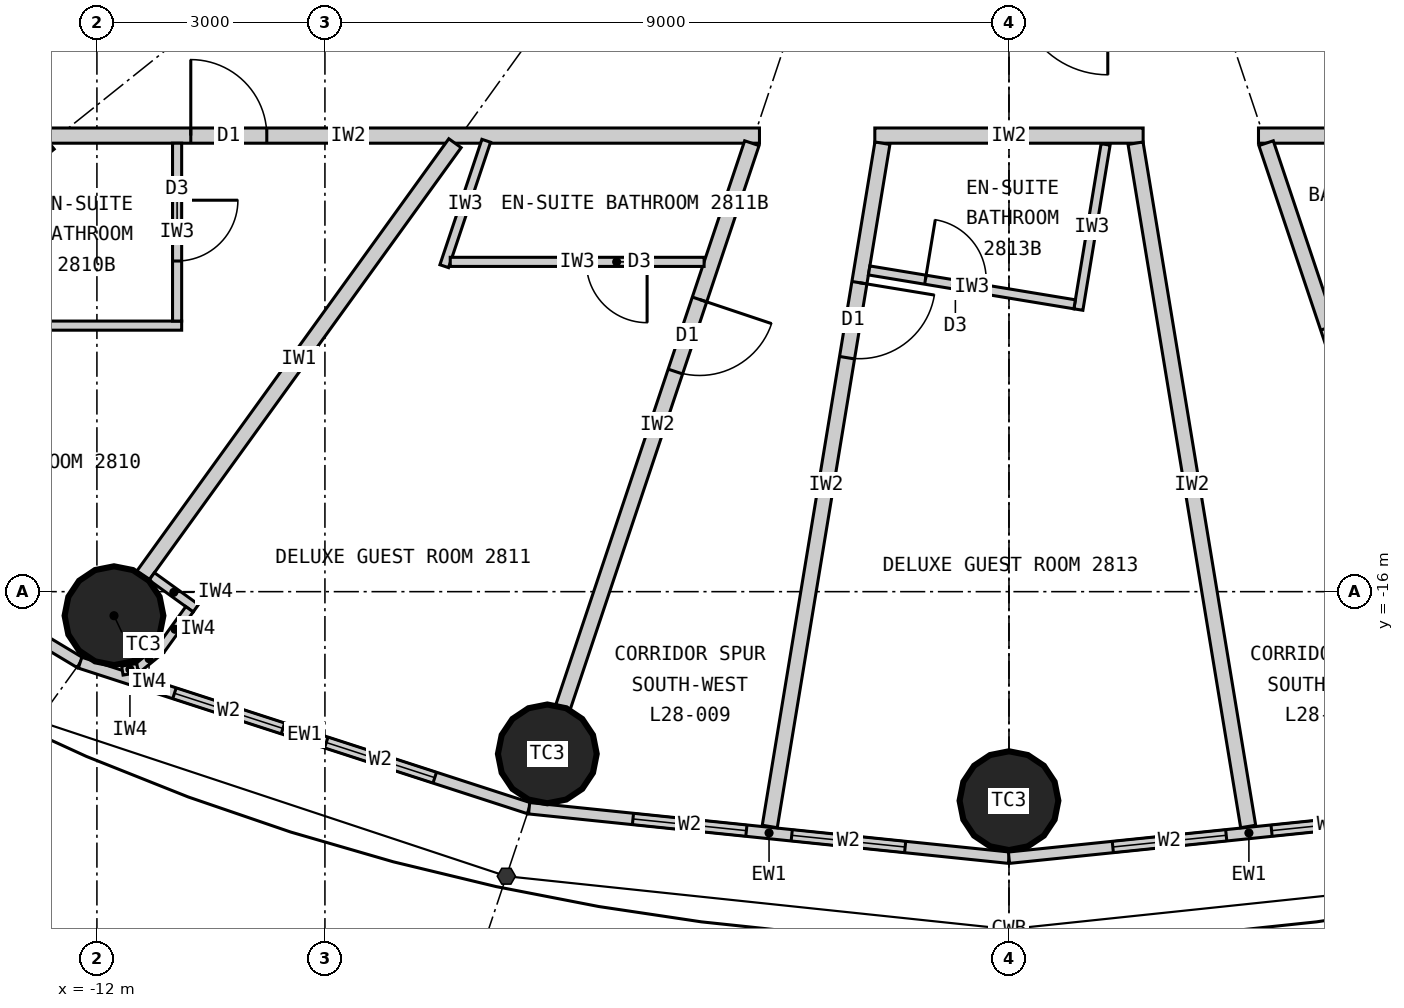
"""IFC4 building model, lengths in metres.
Left out: names, types, materials, properties, quantities, classifications, styles, units other than length and angle.
Written with IfcOpenShell. Run it as: python <this file> out.ifc"""

import sys

from ifc_helpers import new_model, si_unit, direction, frame, frame_2d, origin, origin_2d, place, context, subcontext, project, spatial, rectangle, circle, extrude, element, fill, save


model = new_model("IFC4")
c1 = context("Model", 3, precision=1e-05, world=origin(), true_north=direction((0.0, 1.0)))
c2 = subcontext(c1, "Body", "Model", "MODEL_VIEW")
j1 = project(units=[si_unit("LENGTHUNIT", "METRE"), si_unit("PLANEANGLEUNIT", "RADIAN")], contexts=[c1])
p1 = place(None, origin())
s1 = spatial("IfcSite", under=j1, at=p1, CompositionType="ELEMENT")
p2 = place(p1, origin())
s2 = spatial("IfcBuilding", under=s1, at=p2, CompositionType="ELEMENT")
p3 = place(p2, frame((0.0, 0.0, 112.2)))
s3 = spatial("IfcBuildingStorey", under=s2, at=p3, CompositionType="ELEMENT", Elevation=112.2)
for number, where, z_axis, x_axis in (
    (1, (-11.775, -16.316, 0.0), (0.0, 0.0, 1.0), (1.0, 0.0, 0.0)),
    (2, (-6.074, -18.135, 0.0), (0.0, 0.0, 1.0), (1.0, 0.0, 0.0)),
    (3, (0.0, -18.75, 0.0), (0.0, 0.0, 1.0), (1.0, 0.0, 0.0)),
):
    element("IfcColumn", number, at=place(p3, frame(where, z_axis=z_axis, x_axis=x_axis)), inside=s3, PredefinedType="COLUMN", context=c2, shape_type="SweptSolid", body=[
        extrude(circle(Radius=0.65, at=origin_2d()), origin(), (0.0, 0.0, 1.0), 3.3),
    ])
p4 = place(p3, frame((-17.332, -13.866, 0.0), z_axis=(0.0, 0.0, 1.0), x_axis=(0.857308573723, -0.514802884044, 0.0)))
e4 = element("IfcWall", 4, at=p4, inside=s3, PredefinedType="ELEMENTEDWALL", context=c2, shape_type="SweptSolid", body=[
    extrude(rectangle(XDim=5.961, YDim=0.15, at=frame_2d((2.98, 0.0))), origin(), (0.0, 0.0, 1.0), 3.12),
])
p5 = place(p4, frame((1.181, 0.0, 0.9)))
e5 = element("IfcOpeningElement", 5, at=p5, cuts=e4, PredefinedType="OPENING", context=c2, shape_type="SweptSolid", body=[
    extrude(rectangle(XDim=1.5, YDim=1.9, at=frame_2d((0.75, 0.95))), frame((0.0, 0.085, 0.0), z_axis=(0.0, -1.0, 0.0), x_axis=(1.0, 0.0, 0.0)), (0.0, 0.0, 1.0), 0.17),
])
p6 = place(p4, frame((3.281, 0.0, 0.9)))
e6 = element("IfcOpeningElement", 6, at=p6, cuts=e4, PredefinedType="OPENING", context=c2, shape_type="SweptSolid", body=[
    extrude(rectangle(XDim=1.5, YDim=1.9, at=frame_2d((0.75, 0.95))), frame((0.0, 0.085, 0.0), z_axis=(0.0, -1.0, 0.0), x_axis=(1.0, 0.0, 0.0)), (0.0, 0.0, 1.0), 0.17),
])
p7 = place(p3, frame((-12.221, -16.935, 0.0), z_axis=(0.0, 0.0, 1.0), x_axis=(0.951272691506, -0.308350881944, 0.0)))
e7 = element("IfcWall", 7, at=p7, inside=s3, PredefinedType="ELEMENTEDWALL", context=c2, shape_type="SweptSolid", body=[
    extrude(rectangle(XDim=6.211, YDim=0.15, at=frame_2d((3.105, 0.0))), origin(), (0.0, 0.0, 1.0), 3.12),
])
p8 = place(p7, frame((1.305, 0.0, 0.9)))
e8 = element("IfcOpeningElement", 8, at=p8, cuts=e7, PredefinedType="OPENING", context=c2, shape_type="SweptSolid", body=[
    extrude(rectangle(XDim=1.5, YDim=1.9, at=frame_2d((0.75, 0.95))), frame((0.0, 0.085, 0.0), z_axis=(0.0, -1.0, 0.0), x_axis=(1.0, 0.0, 0.0)), (0.0, 0.0, 1.0), 0.17),
])
p9 = place(p7, frame((3.405, 0.0, 0.9)))
e9 = element("IfcOpeningElement", 9, at=p9, cuts=e7, PredefinedType="OPENING", context=c2, shape_type="SweptSolid", body=[
    extrude(rectangle(XDim=1.5, YDim=1.9, at=frame_2d((0.75, 0.95))), frame((0.0, 0.085, 0.0), z_axis=(0.0, -1.0, 0.0), x_axis=(1.0, 0.0, 0.0)), (0.0, 0.0, 1.0), 0.17),
])
p10 = place(p3, frame((-6.313, -18.85, 0.0), z_axis=(0.0, 0.0, 1.0), x_axis=(0.994735690163, -0.102473931887, 0.0)))
e10 = element("IfcWall", 10, at=p10, inside=s3, PredefinedType="ELEMENTEDWALL", context=c2, shape_type="SweptSolid", body=[
    extrude(rectangle(XDim=6.347, YDim=0.15, at=frame_2d((3.173, 0.0))), origin(), (0.0, 0.0, 1.0), 3.12),
])
p11 = place(p10, frame((1.373, 0.0, 0.9)))
e11 = element("IfcOpeningElement", 11, at=p11, cuts=e10, PredefinedType="OPENING", context=c2, shape_type="SweptSolid", body=[
    extrude(rectangle(XDim=1.5, YDim=1.9, at=frame_2d((0.75, 0.95))), frame((0.0, 0.085, 0.0), z_axis=(0.0, -1.0, 0.0), x_axis=(1.0, 0.0, 0.0)), (0.0, 0.0, 1.0), 0.17),
])
p12 = place(p10, frame((3.473, 0.0, 0.9)))
e12 = element("IfcOpeningElement", 12, at=p12, cuts=e10, PredefinedType="OPENING", context=c2, shape_type="SweptSolid", body=[
    extrude(rectangle(XDim=1.5, YDim=1.9, at=frame_2d((0.75, 0.95))), frame((0.0, 0.085, 0.0), z_axis=(0.0, -1.0, 0.0), x_axis=(1.0, 0.0, 0.0)), (0.0, 0.0, 1.0), 0.17),
])
p13 = place(p3, frame((0.0, -19.5, 0.0), z_axis=(0.0, 0.0, 1.0), x_axis=(0.994735690163, 0.102473931887, 0.0)))
e13 = element("IfcWall", 13, at=p13, inside=s3, PredefinedType="ELEMENTEDWALL", context=c2, shape_type="SweptSolid", body=[
    extrude(rectangle(XDim=6.347, YDim=0.15, at=frame_2d((3.173, 0.0))), origin(), (0.0, 0.0, 1.0), 3.12),
])
p14 = place(p13, frame((1.373, 0.0, 0.9)))
e14 = element("IfcOpeningElement", 14, at=p14, cuts=e13, PredefinedType="OPENING", context=c2, shape_type="SweptSolid", body=[
    extrude(rectangle(XDim=1.5, YDim=1.9, at=frame_2d((0.75, 0.95))), frame((0.0, 0.085, 0.0), z_axis=(0.0, -1.0, 0.0), x_axis=(1.0, 0.0, 0.0)), (0.0, 0.0, 1.0), 0.17),
])
p15 = place(p13, frame((3.473, 0.0, 0.9)))
e15 = element("IfcOpeningElement", 15, at=p15, cuts=e13, PredefinedType="OPENING", context=c2, shape_type="SweptSolid", body=[
    extrude(rectangle(XDim=1.5, YDim=1.9, at=frame_2d((0.75, 0.95))), frame((0.0, 0.085, 0.0), z_axis=(0.0, -1.0, 0.0), x_axis=(1.0, 0.0, 0.0)), (0.0, 0.0, 1.0), 0.17),
])
p16 = place(p3, frame((14.1, -10.0, 0.0), z_axis=(0.0, 0.0, 1.0), x_axis=(-1.0, 0.0, 0.0)))
e16 = element("IfcWall", 16, at=p16, inside=s3, PredefinedType="PARTITIONING", context=c2, shape_type="SweptSolid", body=[
    extrude(rectangle(XDim=10.817, YDim=0.2, at=frame_2d((5.409, 0.0))), origin(), (0.0, 0.0, 1.0), 3.12),
])
p17 = place(p3, frame((1.765, -10.0, 0.0), z_axis=(0.0, 0.0, 1.0), x_axis=(-1.0, 0.0, 0.0)))
e17 = element("IfcWall", 17, at=p17, inside=s3, PredefinedType="PARTITIONING", context=c2, shape_type="SweptSolid", body=[
    extrude(rectangle(XDim=3.53, YDim=0.2, at=frame_2d((1.765, 0.0))), origin(), (0.0, 0.0, 1.0), 3.12),
])
p18 = place(p3, frame((-3.283, -10.0, 0.0), z_axis=(0.0, 0.0, 1.0), x_axis=(-1.0, 0.0, 0.0)))
e18 = element("IfcWall", 18, at=p18, inside=s3, PredefinedType="PARTITIONING", context=c2, shape_type="SweptSolid", body=[
    extrude(rectangle(XDim=10.817, YDim=0.2, at=frame_2d((5.409, 0.0))), origin(), (0.0, 0.0, 1.0), 3.12),
])
p19 = place(p18, frame((6.482, 0.0, 0.0)))
e19 = element("IfcOpeningElement", 19, at=p19, cuts=e18, PredefinedType="OPENING", context=c2, shape_type="SweptSolid", body=[
    extrude(rectangle(XDim=1.0, YDim=2.2, at=frame_2d((0.5, 1.1))), frame((0.0, 0.11, 0.0), z_axis=(0.0, -1.0, 0.0), x_axis=(1.0, 0.0, 0.0)), (0.0, 0.0, 1.0), 0.22),
])
p20 = place(p3, frame((-12.625, -10.1, 0.0), z_axis=(0.0, 0.0, 1.0), x_axis=(-0.780863644897, -0.624701503182, 0.0)))
e20 = element("IfcWall", 20, at=p20, inside=s3, PredefinedType="PARTITIONING", context=c2, shape_type="SweptSolid", body=[
    extrude(rectangle(XDim=4.612, YDim=0.2, at=frame_2d((2.306, 0.0))), origin(), (0.0, 0.0, 1.0), 2.37),
])
p21 = place(p3, frame((-7.289, -10.1, 0.0), z_axis=(0.0, 0.0, 1.0), x_axis=(-0.585217367024, -0.81087645997, 0.0)))
e21 = element("IfcWall", 21, at=p21, inside=s3, PredefinedType="PARTITIONING", context=c2, shape_type="SweptSolid", body=[
    extrude(rectangle(XDim=7.016, YDim=0.2, at=frame_2d((3.508, 0.0))), origin(), (0.0, 0.0, 1.0), 2.37),
])
p22 = place(p3, frame((-3.383, -10.1, 0.0), z_axis=(0.0, 0.0, 1.0), x_axis=(-0.317603705574, -0.948223542318, 0.0)))
e22 = element("IfcWall", 22, at=p22, inside=s3, PredefinedType="PARTITIONING", context=c2, shape_type="SweptSolid", body=[
    extrude(rectangle(XDim=7.823, YDim=0.2, at=frame_2d((3.912, 0.0))), origin(), (0.0, 0.0, 1.0), 2.37),
])
p23 = place(p22, frame((2.168, 0.0, 0.0)))
e23 = element("IfcOpeningElement", 23, at=p23, cuts=e22, PredefinedType="OPENING", context=c2, shape_type="SweptSolid", body=[
    extrude(rectangle(XDim=1.0, YDim=2.2, at=frame_2d((0.5, 1.1))), frame((0.0, 0.11, 0.0), z_axis=(0.0, -1.0, 0.0), x_axis=(1.0, 0.0, 0.0)), (0.0, 0.0, 1.0), 0.22),
])
p24 = place(p3, frame((-1.665, -10.1, 0.0), z_axis=(0.0, 0.0, 1.0), x_axis=(-0.162660519103, -0.986682094459, 0.0)))
e24 = element("IfcWall", 24, at=p24, inside=s3, PredefinedType="PARTITIONING", context=c2, shape_type="SweptSolid", body=[
    extrude(rectangle(XDim=9.111, YDim=0.2, at=frame_2d((4.555, 0.0))), origin(), (0.0, 0.0, 1.0), 3.12),
])
p25 = place(p24, frame((1.86, 0.0, 0.0)))
e25 = element("IfcOpeningElement", 25, at=p25, cuts=e24, PredefinedType="OPENING", context=c2, shape_type="SweptSolid", body=[
    extrude(rectangle(XDim=1.0, YDim=2.2, at=frame_2d((0.5, 1.1))), frame((0.0, 0.11, 0.0), z_axis=(0.0, -1.0, 0.0), x_axis=(1.0, 0.0, 0.0)), (0.0, 0.0, 1.0), 0.22),
])
p26 = place(p3, frame((1.665, -10.1, 0.0), z_axis=(0.0, 0.0, 1.0), x_axis=(0.162660519103, -0.986682094459, 0.0)))
e26 = element("IfcWall", 26, at=p26, inside=s3, PredefinedType="PARTITIONING", context=c2, shape_type="SweptSolid", body=[
    extrude(rectangle(XDim=9.111, YDim=0.2, at=frame_2d((4.555, 0.0))), origin(), (0.0, 0.0, 1.0), 3.12),
])
p27 = place(p3, frame((3.383, -10.1, 0.0), z_axis=(0.0, 0.0, 1.0), x_axis=(0.317603705574, -0.948223542318, 0.0)))
e27 = element("IfcWall", 27, at=p27, inside=s3, PredefinedType="PARTITIONING", context=c2, shape_type="SweptSolid", body=[
    extrude(rectangle(XDim=7.823, YDim=0.2, at=frame_2d((3.912, 0.0))), origin(), (0.0, 0.0, 1.0), 2.37),
])
p28 = place(p27, frame((2.56, 0.0, 0.0)))
e28 = element("IfcOpeningElement", 28, at=p28, cuts=e27, PredefinedType="OPENING", context=c2, shape_type="SweptSolid", body=[
    extrude(rectangle(XDim=1.0, YDim=2.2, at=frame_2d((0.5, 1.1))), frame((0.0, 0.11, 0.0), z_axis=(0.0, -1.0, 0.0), x_axis=(1.0, 0.0, 0.0)), (0.0, 0.0, 1.0), 0.22),
])
p29 = place(p3, frame((-15.525, -12.5, 0.0), z_axis=(0.0, 0.0, 1.0), x_axis=(1.0, 0.0, 0.0)))
e29 = element("IfcWall", 29, at=p29, inside=s3, PredefinedType="PARTITIONING", context=c2, shape_type="SweptSolid", body=[
    extrude(rectangle(XDim=4.64, YDim=0.12, at=frame_2d((2.32, 0.0))), origin(), (0.0, 0.0, 1.0), 3.12),
])
p30 = place(p3, frame((-10.945, -10.1, 0.0), z_axis=(0.0, 0.0, 1.0), x_axis=(0.0, -1.0, 0.0)))
e30 = element("IfcWall", 30, at=p30, inside=s3, PredefinedType="PARTITIONING", context=c2, shape_type="SweptSolid", body=[
    extrude(rectangle(XDim=2.34, YDim=0.12, at=frame_2d((1.17, 0.0))), origin(), (0.0, 0.0, 1.0), 3.12),
])
p31 = place(p30, frame((0.75, 0.0, 0.0)))
e31 = element("IfcOpeningElement", 31, at=p31, cuts=e30, PredefinedType="OPENING", context=c2, shape_type="SweptSolid", body=[
    extrude(rectangle(XDim=0.8, YDim=2.1, at=frame_2d((0.4, 1.05))), frame((0.0, 0.07, 0.0), z_axis=(0.0, -1.0, 0.0), x_axis=(1.0, 0.0, 0.0)), (0.0, 0.0, 1.0), 0.14),
])
p32 = place(p3, frame((-6.878, -10.068, 0.0), z_axis=(0.0, 0.0, 1.0), x_axis=(-0.317532394508, -0.948247424694, 0.0)))
e32 = element("IfcWall", 32, at=p32, inside=s3, PredefinedType="PARTITIONING", context=c2, shape_type="SweptSolid", body=[
    extrude(rectangle(XDim=1.74, YDim=0.12, at=frame_2d((0.87, 0.0))), origin(), (0.0, 0.0, 1.0), 3.12),
])
p33 = place(p3, frame((-4.011, -11.661, 0.0), z_axis=(0.0, 0.0, 1.0), x_axis=(-1.0, 0.0, 0.0)))
e33 = element("IfcWall", 33, at=p33, inside=s3, PredefinedType="PARTITIONING", context=c2, shape_type="SweptSolid", body=[
    extrude(rectangle(XDim=3.34, YDim=0.12, at=frame_2d((1.67, 0.0))), origin(), (0.0, 0.0, 1.0), 3.12),
])
p34 = place(p33, frame((0.75, 0.0, 0.0)))
e34 = element("IfcOpeningElement", 34, at=p34, cuts=e33, PredefinedType="OPENING", context=c2, shape_type="SweptSolid", body=[
    extrude(rectangle(XDim=0.8, YDim=2.1, at=frame_2d((0.4, 1.05))), frame((0.0, 0.07, 0.0), z_axis=(0.0, -1.0, 0.0), x_axis=(1.0, 0.0, 0.0)), (0.0, 0.0, 1.0), 0.14),
])
p35 = place(p3, frame((1.271, -10.116, 0.0), z_axis=(0.0, 0.0, 1.0), x_axis=(-0.162672481395, -0.986680122328, 0.0)))
e35 = element("IfcWall", 35, at=p35, inside=s3, PredefinedType="PARTITIONING", context=c2, shape_type="SweptSolid", body=[
    extrude(rectangle(XDim=2.202, YDim=0.12, at=frame_2d((1.101, 0.0))), origin(), (0.0, 0.0, 1.0), 3.12),
])
p36 = place(p3, frame((-1.84, -11.774, 0.0), z_axis=(0.0, 0.0, 1.0), x_axis=(0.986676602341, -0.162693830222, 0.0)))
e36 = element("IfcWall", 36, at=p36, inside=s3, PredefinedType="PARTITIONING", context=c2, shape_type="SweptSolid", body=[
    extrude(rectangle(XDim=2.74, YDim=0.12, at=frame_2d((1.37, 0.0))), origin(), (0.0, 0.0, 1.0), 3.12),
])
p37 = place(p36, frame((0.75, 0.0, 0.0)))
e37 = element("IfcOpeningElement", 37, at=p37, cuts=e36, PredefinedType="OPENING", context=c2, shape_type="SweptSolid", body=[
    extrude(rectangle(XDim=0.8, YDim=2.1, at=frame_2d((0.4, 1.05))), frame((0.0, 0.07, 0.0), z_axis=(0.0, -1.0, 0.0), x_axis=(1.0, 0.0, 0.0)), (0.0, 0.0, 1.0), 0.14),
])
p38 = place(p3, frame((-11.279, -15.799, 0.0), z_axis=(0.0, 0.0, 1.0), x_axis=(0.810912957127, -0.585166793285, 0.0)))
e38 = element("IfcWall", 38, at=p38, inside=s3, PredefinedType="PARTITIONING", context=c2, shape_type="SweptSolid", body=[
    extrude(rectangle(XDim=0.716, YDim=0.12, at=frame_2d((0.358, 0.0))), origin(), (0.0, 0.0, 1.0), 3.12),
])
p39 = place(p3, frame((-10.782, -16.231, 0.0), z_axis=(0.0, 0.0, 1.0), x_axis=(-0.585175102182, -0.810906961239, 0.0)))
e39 = element("IfcWall", 39, at=p39, inside=s3, PredefinedType="PARTITIONING", context=c2, shape_type="SweptSolid", body=[
    extrude(rectangle(XDim=0.65, YDim=0.12, at=frame_2d((0.325, 0.0))), origin(), (0.0, 0.0, 1.0), 3.12),
])
p40 = place(p3, frame((-11.162, -16.759, 0.0), z_axis=(0.0, 0.0, 1.0), x_axis=(-0.775178428527, -0.63174235567, 0.0)))
e40 = element("IfcWall", 40, at=p40, inside=s3, PredefinedType="PARTITIONING", context=c2, shape_type="SweptSolid", body=[
    extrude(rectangle(XDim=0.392, YDim=0.12, at=frame_2d((0.196, 0.0))), origin(), (0.0, 0.0, 1.0), 3.12),
])
p41 = place(p3, frame((-11.466, -17.006, 0.0), z_axis=(0.0, 0.0, 1.0), x_axis=(-0.987228877621, -0.15930832744, 0.0)))
e41 = element("IfcWall", 41, at=p41, inside=s3, PredefinedType="PARTITIONING", context=c2, shape_type="SweptSolid", body=[
    extrude(rectangle(XDim=0.202, YDim=0.12, at=frame_2d((0.101, 0.0))), origin(), (0.0, 0.0, 1.0), 3.12),
])
p42 = place(p8, origin())
e42 = element("IfcWindow", 42, at=p42, inside=s3, PartitioningType="SINGLE_PANEL", PredefinedType="WINDOW", context=c2, shape_type="SweptSolid", body=[
    extrude(rectangle(XDim=1.5, YDim=1.9, at=frame_2d((0.75, 0.95))), frame((0.0, 0.03, 0.0), z_axis=(0.0, -1.0, 0.0), x_axis=(1.0, 0.0, 0.0)), (0.0, 0.0, 1.0), 0.06),
])
fill(e8, e42)
p43 = place(p9, origin())
e43 = element("IfcWindow", 43, at=p43, inside=s3, PartitioningType="SINGLE_PANEL", PredefinedType="WINDOW", context=c2, shape_type="SweptSolid", body=[
    extrude(rectangle(XDim=1.5, YDim=1.9, at=frame_2d((0.75, 0.95))), frame((0.0, 0.03, 0.0), z_axis=(0.0, -1.0, 0.0), x_axis=(1.0, 0.0, 0.0)), (0.0, 0.0, 1.0), 0.06),
])
fill(e9, e43)
p44 = place(p11, origin())
e44 = element("IfcWindow", 44, at=p44, inside=s3, PartitioningType="SINGLE_PANEL", PredefinedType="WINDOW", context=c2, shape_type="SweptSolid", body=[
    extrude(rectangle(XDim=1.5, YDim=1.9, at=frame_2d((0.75, 0.95))), frame((0.0, 0.03, 0.0), z_axis=(0.0, -1.0, 0.0), x_axis=(1.0, 0.0, 0.0)), (0.0, 0.0, 1.0), 0.06),
])
fill(e11, e44)
p45 = place(p12, origin())
e45 = element("IfcWindow", 45, at=p45, inside=s3, PartitioningType="SINGLE_PANEL", PredefinedType="WINDOW", context=c2, shape_type="SweptSolid", body=[
    extrude(rectangle(XDim=1.5, YDim=1.9, at=frame_2d((0.75, 0.95))), frame((0.0, 0.03, 0.0), z_axis=(0.0, -1.0, 0.0), x_axis=(1.0, 0.0, 0.0)), (0.0, 0.0, 1.0), 0.06),
])
fill(e12, e45)
p46 = place(p14, origin())
e46 = element("IfcWindow", 46, at=p46, inside=s3, PartitioningType="SINGLE_PANEL", PredefinedType="WINDOW", context=c2, shape_type="SweptSolid", body=[
    extrude(rectangle(XDim=1.5, YDim=1.9, at=frame_2d((0.75, 0.95))), frame((0.0, 0.03, 0.0), z_axis=(0.0, -1.0, 0.0), x_axis=(1.0, 0.0, 0.0)), (0.0, 0.0, 1.0), 0.06),
])
fill(e14, e46)
p47 = place(p15, origin())
e47 = element("IfcWindow", 47, at=p47, inside=s3, PartitioningType="SINGLE_PANEL", PredefinedType="WINDOW", context=c2, shape_type="SweptSolid", body=[
    extrude(rectangle(XDim=1.5, YDim=1.9, at=frame_2d((0.75, 0.95))), frame((0.0, 0.03, 0.0), z_axis=(0.0, -1.0, 0.0), x_axis=(1.0, 0.0, 0.0)), (0.0, 0.0, 1.0), 0.06),
])
fill(e15, e47)
p48 = place(p31, origin())
e48 = element("IfcDoor", 48, at=p48, inside=s3, OperationType="SINGLE_SWING_LEFT", PredefinedType="DOOR", context=c2, shape_type="SweptSolid", body=[
    extrude(rectangle(XDim=0.8, YDim=2.1, at=frame_2d((0.4, 1.05))), frame((0.0, 0.025, 0.0), z_axis=(0.0, -1.0, 0.0), x_axis=(1.0, 0.0, 0.0)), (0.0, 0.0, 1.0), 0.05),
])
fill(e31, e48)
p49 = place(p19, origin())
e49 = element("IfcDoor", 49, at=p49, inside=s3, OperationType="SINGLE_SWING_RIGHT", PredefinedType="DOOR", context=c2, shape_type="SweptSolid", body=[
    extrude(rectangle(XDim=1.0, YDim=2.2, at=frame_2d((0.5, 1.1))), frame((0.0, 0.025, 0.0), z_axis=(0.0, -1.0, 0.0), x_axis=(1.0, 0.0, 0.0)), (0.0, 0.0, 1.0), 0.05),
])
fill(e19, e49)
p50 = place(p34, origin())
e50 = element("IfcDoor", 50, at=p50, inside=s3, OperationType="SINGLE_SWING_LEFT", PredefinedType="DOOR", context=c2, shape_type="SweptSolid", body=[
    extrude(rectangle(XDim=0.8, YDim=2.1, at=frame_2d((0.4, 1.05))), frame((0.0, 0.025, 0.0), z_axis=(0.0, -1.0, 0.0), x_axis=(1.0, 0.0, 0.0)), (0.0, 0.0, 1.0), 0.05),
])
fill(e34, e50)
p51 = place(p23, origin())
e51 = element("IfcDoor", 51, at=p51, inside=s3, OperationType="SINGLE_SWING_LEFT", PredefinedType="DOOR", context=c2, shape_type="SweptSolid", body=[
    extrude(rectangle(XDim=1.0, YDim=2.2, at=frame_2d((0.5, 1.1))), frame((0.0, 0.025, 0.0), z_axis=(0.0, -1.0, 0.0), x_axis=(1.0, 0.0, 0.0)), (0.0, 0.0, 1.0), 0.05),
])
fill(e23, e51)
p52 = place(p37, origin())
e52 = element("IfcDoor", 52, at=p52, inside=s3, OperationType="SINGLE_SWING_LEFT", PredefinedType="DOOR", context=c2, shape_type="SweptSolid", body=[
    extrude(rectangle(XDim=0.8, YDim=2.1, at=frame_2d((0.4, 1.05))), frame((0.0, 0.025, 0.0), z_axis=(0.0, -1.0, 0.0), x_axis=(1.0, 0.0, 0.0)), (0.0, 0.0, 1.0), 0.05),
])
fill(e37, e52)
p53 = place(p25, origin())
e53 = element("IfcDoor", 53, at=p53, inside=s3, OperationType="SINGLE_SWING_LEFT", PredefinedType="DOOR", context=c2, shape_type="SweptSolid", body=[
    extrude(rectangle(XDim=1.0, YDim=2.2, at=frame_2d((0.5, 1.1))), frame((0.0, 0.025, 0.0), z_axis=(0.0, -1.0, 0.0), x_axis=(1.0, 0.0, 0.0)), (0.0, 0.0, 1.0), 0.05),
])
fill(e25, e53)
save(model, sys.argv[1])
